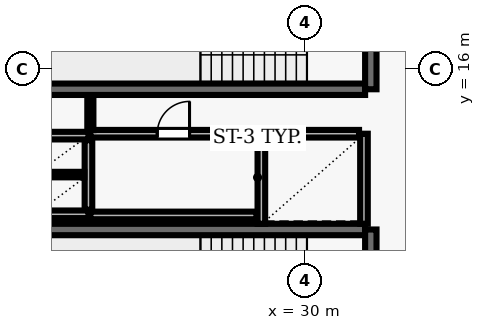
"""IFC4 building model, lengths in metres.
Left out: names, types, materials, properties, quantities, classifications, styles, units other than length and angle.
Written with IfcOpenShell. Run it as: python <this file> out.ifc"""

import sys

from ifc_helpers import new_model, si_unit, direction, frame, frame_2d, origin, place, context, subcontext, project, spatial, rectangle, extrude, element, fill, save


model = new_model("IFC4")
c1 = context("Model", 3, precision=1e-05, world=origin(), true_north=direction((0.0, 1.0)))
c2 = subcontext(c1, "Body", "Model", "MODEL_VIEW")
j1 = project(units=[si_unit("LENGTHUNIT", "METRE"), si_unit("PLANEANGLEUNIT", "RADIAN")], contexts=[c1])
p1 = place(None, origin())
s1 = spatial("IfcSite", under=j1, at=p1, CompositionType="ELEMENT")
p2 = place(p1, origin())
s2 = spatial("IfcBuilding", under=s1, at=p2, CompositionType="ELEMENT")
p3 = place(p2, frame((0.0, 0.0, 126.8)))
s3 = spatial("IfcBuildingStorey", under=s2, at=p3, CompositionType="ELEMENT", Elevation=126.8)
p4 = place(p3, frame((23.22, 15.47, 0.0), z_axis=(0.0, 0.0, 1.0), x_axis=(1.0, 0.0, 0.0)))
e1 = element("IfcWall", 1, at=p4, inside=s3, PredefinedType="SHEAR", context=c2, shape_type="SweptSolid", body=[
    extrude(rectangle(XDim=8.36, YDim=0.3, at=frame_2d((4.18, 0.0))), origin(), (0.0, 0.0, 1.0), 3.69),
])
p5 = place(p3, frame((31.73, 15.47, 0.0), z_axis=(0.0, 0.0, 1.0), x_axis=(0.0, 1.0, 0.0)))
e2 = element("IfcWall", 2, at=p5, inside=s3, PredefinedType="SHEAR", context=c2, shape_type="SweptSolid", body=[
    extrude(rectangle(XDim=3.51, YDim=0.3, at=frame_2d((1.755, 0.0))), origin(), (0.0, 0.0, 1.0), 3.69),
])
p6 = place(p5, frame((1.18, 0.0, 0.0)))
e3 = element("IfcOpeningElement", 3, at=p6, cuts=e2, PredefinedType="OPENING", context=c2, shape_type="SweptSolid", body=[
    extrude(rectangle(XDim=1.15, YDim=2.15, at=frame_2d((0.575, 1.075))), frame((0.0, 0.16, 0.0), z_axis=(0.0, -1.0, 0.0), x_axis=(1.0, 0.0, 0.0)), (0.0, 0.0, 1.0), 0.32),
])
p7 = place(p3, frame((31.58, 11.78, 0.0), z_axis=(0.0, 0.0, 1.0), x_axis=(-1.0, 0.0, 0.0)))
e4 = element("IfcWall", 4, at=p7, inside=s3, PredefinedType="SHEAR", context=c2, shape_type="SweptSolid", body=[
    extrude(rectangle(XDim=8.36, YDim=0.3, at=frame_2d((4.18, 0.0))), origin(), (0.0, 0.0, 1.0), 3.69),
])
p8 = place(p3, frame((31.73, 8.27, 0.0), z_axis=(0.0, 0.0, 1.0), x_axis=(0.0, 1.0, 0.0)))
e5 = element("IfcWall", 5, at=p8, inside=s3, PredefinedType="SHEAR", context=c2, shape_type="SweptSolid", body=[
    extrude(rectangle(XDim=3.51, YDim=0.3, at=frame_2d((1.755, 0.0))), origin(), (0.0, 0.0, 1.0), 3.69),
])
p9 = place(p8, frame((1.18, 0.0, 0.0)))
e6 = element("IfcOpeningElement", 6, at=p9, cuts=e5, PredefinedType="OPENING", context=c2, shape_type="SweptSolid", body=[
    extrude(rectangle(XDim=1.15, YDim=2.15, at=frame_2d((0.575, 1.075))), frame((0.0, 0.16, 0.0), z_axis=(0.0, -1.0, 0.0), x_axis=(1.0, 0.0, 0.0)), (0.0, 0.0, 1.0), 0.32),
])
for number, where, z_axis, x_axis in (
    (7, (28.85, 14.3, 0.0), (0.0, 0.0, 1.0), (0.0, -1.0, 0.0)),
    (8, (31.55, 11.93, 0.0), (0.0, 0.0, 1.0), (0.0, 1.0, 0.0)),
):
    element("IfcWall", number, at=place(p3, frame(where, z_axis=z_axis, x_axis=x_axis)), inside=s3, PredefinedType="SOLIDWALL", context=c2, shape_type="SweptSolid", body=[
        extrude(rectangle(XDim=2.37, YDim=0.2, at=frame_2d((1.185, 0.0))), origin(), (0.0, 0.0, 1.0), 3.69),
    ])
p10 = place(p3, frame((31.42, 14.3, 0.0), z_axis=(0.0, 0.0, 1.0), x_axis=(-1.0, 0.0, 0.0)))
e9 = element("IfcWall", 9, at=p10, inside=s3, PredefinedType="SOLIDWALL", context=c2, shape_type="SweptSolid", body=[
    extrude(rectangle(XDim=2.44, YDim=0.2, at=frame_2d((1.22, 0.0))), origin(), (0.0, 0.0, 1.0), 3.69),
])
for number, where, z_axis, x_axis in (
    (10, (22.9, 14.25, 0.0), (0.0, 0.0, 1.0), (1.0, 0.0, 0.0)),
    (11, (22.9, 12.18, 0.0), (0.0, 0.0, 1.0), (1.0, 0.0, 0.0)),
):
    element("IfcWall", number, at=place(p3, frame(where, z_axis=z_axis, x_axis=x_axis)), inside=s3, PredefinedType="SOLIDWALL", context=c2, shape_type="SweptSolid", body=[
        extrude(rectangle(XDim=1.4, YDim=0.2, at=frame_2d((0.7, 0.0))), origin(), (0.0, 0.0, 1.0), 3.69),
    ])
p11 = place(p3, frame((24.3, 12.3, 0.0), z_axis=(0.0, 0.0, 1.0), x_axis=(0.0, 1.0, 0.0)))
e12 = element("IfcWall", 12, at=p11, inside=s3, PredefinedType="SOLIDWALL", context=c2, shape_type="SweptSolid", body=[
    extrude(rectangle(XDim=1.83, YDim=0.2, at=frame_2d((0.915, 0.0))), origin(), (0.0, 0.0, 1.0), 3.69),
])
p12 = place(p3, frame((23.01, 13.225, 0.0), z_axis=(0.0, 0.0, 1.0), x_axis=(1.0, 0.0, 0.0)))
e13 = element("IfcWall", 13, at=p12, inside=s3, PredefinedType="PARTITIONING", context=c2, shape_type="SweptSolid", body=[
    extrude(rectangle(XDim=1.18, YDim=0.145, at=frame_2d((0.59, 0.0))), origin(), (0.0, 0.0, 1.0), 3.69),
])
p13 = place(p3, frame((24.35, 12.15, 0.0), z_axis=(0.0, 0.0, 1.0), x_axis=(1.0, 0.0, 0.0)))
e14 = element("IfcWall", 14, at=p13, inside=s3, PredefinedType="SOLIDWALL", context=c2, shape_type="SweptSolid", body=[
    extrude(rectangle(XDim=4.37, YDim=0.2, at=frame_2d((2.185, 0.0))), origin(), (0.0, 0.0, 1.0), 3.69),
])
p14 = place(p3, frame((24.35, 14.3, 0.0), z_axis=(0.0, 0.0, 1.0), x_axis=(1.0, 0.0, 0.0)))
e15 = element("IfcWall", 15, at=p14, inside=s3, PredefinedType="SOLIDWALL", context=c2, shape_type="SweptSolid", body=[
    extrude(rectangle(XDim=4.37, YDim=0.2, at=frame_2d((2.185, 0.0))), origin(), (0.0, 0.0, 1.0), 3.69),
])
p15 = place(p14, frame((1.76, 0.0, 0.0)))
e16 = element("IfcOpeningElement", 16, at=p15, cuts=e15, PredefinedType="OPENING", context=c2, shape_type="SweptSolid", body=[
    extrude(rectangle(XDim=0.85, YDim=2.1, at=frame_2d((0.425, 1.05))), frame((0.0, 0.11, 0.0), z_axis=(0.0, -1.0, 0.0), x_axis=(1.0, 0.0, 0.0)), (0.0, 0.0, 1.0), 0.22),
])
p16 = place(p3, frame((24.35, 15.29, 0.0), z_axis=(0.0, 0.0, 1.0), x_axis=(0.0, -1.0, 0.0)))
e17 = element("IfcWall", 17, at=p16, inside=s3, PredefinedType="PARTITIONING", context=c2, shape_type="SweptSolid", body=[
    extrude(rectangle(XDim=0.895, YDim=0.16, at=frame_2d((0.448, 0.0))), origin(), (0.0, 0.0, 1.0), 3.69),
])
p17 = place(p15, origin())
e18 = element("IfcDoor", 18, at=p17, inside=s3, OperationType="SINGLE_SWING_RIGHT", PredefinedType="DOOR", context=c2, shape_type="SweptSolid", body=[
    extrude(rectangle(XDim=0.85, YDim=2.1, at=frame_2d((0.425, 1.05))), frame((0.0, 0.025, 0.0), z_axis=(0.0, -1.0, 0.0), x_axis=(1.0, 0.0, 0.0)), (0.0, 0.0, 1.0), 0.05),
])
fill(e16, e18)
save(model, sys.argv[1])
